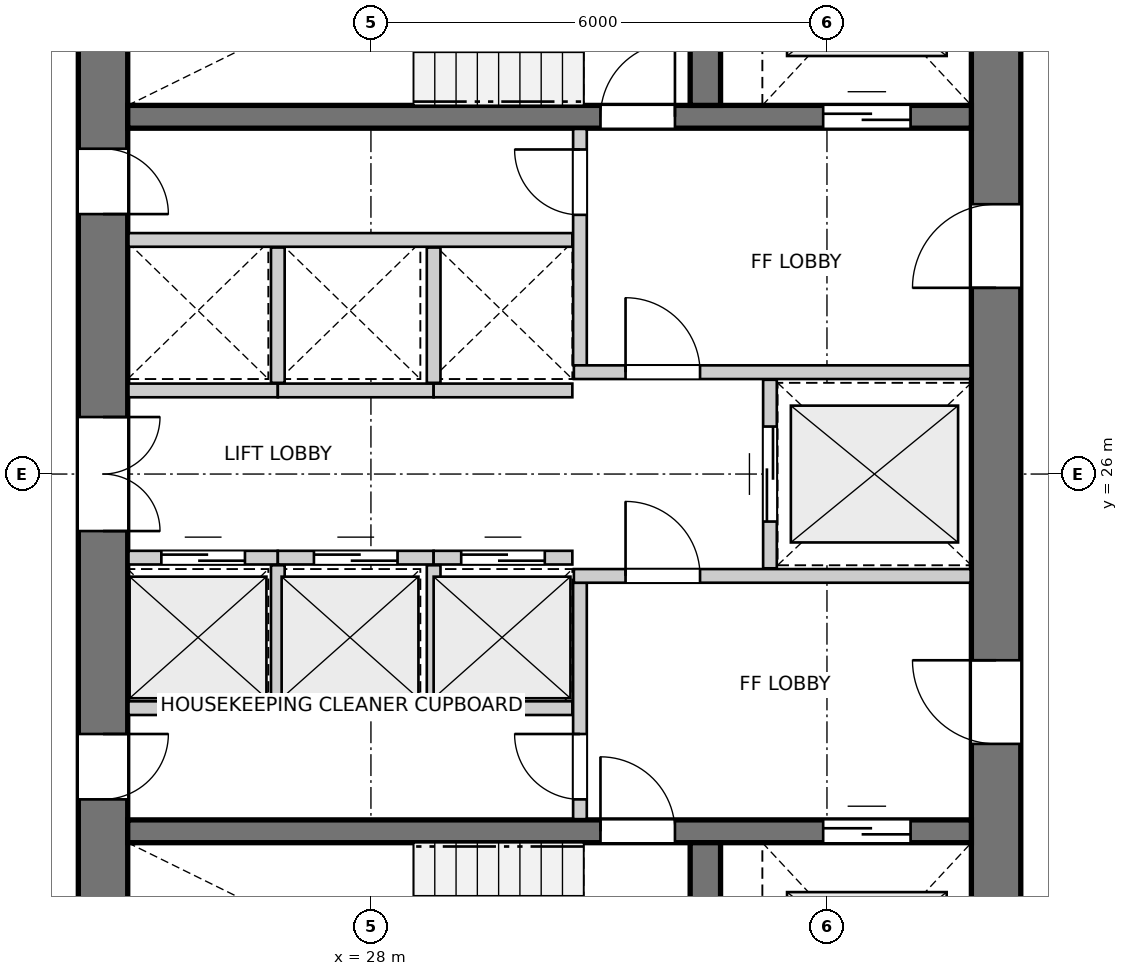
"""IFC4 building model, lengths in metres.
Left out: names, types, materials, properties, quantities, classifications, styles, units other than length and angle.
Written with IfcOpenShell. Run it as: python <this file> out.ifc"""

import sys

from ifc_helpers import new_model, si_unit, direction, frame, frame_2d, origin, place, context, subcontext, project, spatial, rectangle, extrude, source, transform, mapped, element, fill, save


model = new_model("IFC4")
c1 = context("Model", 3, precision=1e-05, world=origin(), true_north=direction((0.0, 1.0)))
c2 = subcontext(c1, "Body", "Model", "MODEL_VIEW")
j1 = project(units=[si_unit("LENGTHUNIT", "METRE"), si_unit("PLANEANGLEUNIT", "RADIAN")], contexts=[c1])
p1 = place(None, origin())
s1 = spatial("IfcSite", under=j1, at=p1, CompositionType="ELEMENT")
p2 = place(p1, origin())
s2 = spatial("IfcBuilding", under=s1, at=p2, CompositionType="ELEMENT")
p3 = place(p2, frame((0.0, 0.0, 99.2)))
s3 = spatial("IfcBuildingStorey", under=s2, at=p3, CompositionType="ELEMENT", Elevation=99.2)
p4 = place(p3, frame((24.475, 33.8, 0.0), z_axis=(0.0, 0.0, 1.0), x_axis=(0.0, -1.0, 0.0)))
e1 = element("IfcWall", 1, at=p4, inside=s3, PredefinedType="SHEAR", context=c2, shape_type="SweptSolid", body=[
    extrude(rectangle(XDim=15.6, YDim=0.65, at=frame_2d((7.8, 0.0))), origin(), (0.0, 0.0, 1.0), 2.95),
])
p5 = place(p4, frame((7.05, 0.0, 0.0)))
e2 = element("IfcOpeningElement", 2, at=p5, cuts=e1, PredefinedType="OPENING", context=c2, shape_type="SweptSolid", body=[
    extrude(rectangle(XDim=1.5, YDim=2.15, at=frame_2d((0.75, 1.075))), frame((0.0, 0.335, 0.0), z_axis=(0.0, -1.0, 0.0), x_axis=(1.0, 0.0, 0.0)), (0.0, 0.0, 1.0), 0.67),
])
p6 = place(p4, frame((3.52, 0.0, 0.0)))
e3 = element("IfcOpeningElement", 3, at=p6, cuts=e1, PredefinedType="OPENING", context=c2, shape_type="SweptSolid", body=[
    extrude(rectangle(XDim=0.86, YDim=2.05, at=frame_2d((0.43, 1.025))), frame((0.0, 0.335, 0.0), z_axis=(0.0, -1.0, 0.0), x_axis=(1.0, 0.0, 0.0)), (0.0, 0.0, 1.0), 0.67),
])
p7 = place(p4, frame((11.22, 0.0, 0.0)))
e4 = element("IfcOpeningElement", 4, at=p7, cuts=e1, PredefinedType="OPENING", context=c2, shape_type="SweptSolid", body=[
    extrude(rectangle(XDim=0.86, YDim=2.05, at=frame_2d((0.43, 1.025))), frame((0.0, 0.335, 0.0), z_axis=(0.0, -1.0, 0.0), x_axis=(1.0, 0.0, 0.0)), (0.0, 0.0, 1.0), 0.67),
])
p8 = place(p3, frame((36.225, 18.2, 0.0), z_axis=(0.0, 0.0, 1.0), x_axis=(0.0, 1.0, 0.0)))
e5 = element("IfcWall", 5, at=p8, inside=s3, PredefinedType="SHEAR", context=c2, shape_type="SweptSolid", body=[
    extrude(rectangle(XDim=15.6, YDim=0.65, at=frame_2d((7.8, 0.0))), origin(), (0.0, 0.0, 1.0), 2.95),
])
p9 = place(p8, frame((4.25, 0.0, 0.0)))
e6 = element("IfcOpeningElement", 6, at=p9, cuts=e5, PredefinedType="OPENING", context=c2, shape_type="SweptSolid", body=[
    extrude(rectangle(XDim=1.1, YDim=2.15, at=frame_2d((0.55, 1.075))), frame((0.0, 0.335, 0.0), z_axis=(0.0, -1.0, 0.0), x_axis=(1.0, 0.0, 0.0)), (0.0, 0.0, 1.0), 0.67),
])
p10 = place(p8, frame((10.25, 0.0, 0.0)))
e7 = element("IfcOpeningElement", 7, at=p10, cuts=e5, PredefinedType="OPENING", context=c2, shape_type="SweptSolid", body=[
    extrude(rectangle(XDim=1.1, YDim=2.15, at=frame_2d((0.55, 1.075))), frame((0.0, 0.335, 0.0), z_axis=(0.0, -1.0, 0.0), x_axis=(1.0, 0.0, 0.0)), (0.0, 0.0, 1.0), 0.67),
])
p11 = place(p3, frame((24.8, 21.3, 0.0), z_axis=(0.0, 0.0, 1.0), x_axis=(1.0, 0.0, 0.0)))
e8 = element("IfcWall", 8, at=p11, inside=s3, PredefinedType="SHEAR", context=c2, shape_type="SweptSolid", body=[
    extrude(rectangle(XDim=11.1, YDim=0.3, at=frame_2d((5.55, 0.0))), origin(), (0.0, 0.0, 1.0), 2.95),
])
p12 = place(p11, frame((6.22, 0.0, 0.0)))
e9 = element("IfcOpeningElement", 9, at=p12, cuts=e8, PredefinedType="OPENING", context=c2, shape_type="SweptSolid", body=[
    extrude(rectangle(XDim=0.98, YDim=2.15, at=frame_2d((0.49, 1.075))), frame((0.0, 0.16, 0.0), z_axis=(0.0, -1.0, 0.0), x_axis=(1.0, 0.0, 0.0)), (0.0, 0.0, 1.0), 0.32),
])
p13 = place(p11, frame((9.15, 0.0, 0.0)))
e10 = element("IfcOpeningElement", 10, at=p13, cuts=e8, PredefinedType="OPENING", context=c2, shape_type="SweptSolid", body=[
    extrude(rectangle(XDim=1.15, YDim=2.15, at=frame_2d((0.575, 1.075))), frame((0.0, 0.16, 0.0), z_axis=(0.0, -1.0, 0.0), x_axis=(1.0, 0.0, 0.0)), (0.0, 0.0, 1.0), 0.32),
])
p14 = place(p3, frame((32.4, 18.2, 0.0), z_axis=(0.0, 0.0, 1.0), x_axis=(0.0, 1.0, 0.0)))
e11 = element("IfcWall", 11, at=p14, inside=s3, PredefinedType="SHEAR", context=c2, shape_type="SweptSolid", body=[
    extrude(rectangle(XDim=2.95, YDim=0.4, at=frame_2d((1.475, 0.0))), origin(), (0.0, 0.0, 1.0), 2.95),
])
p15 = place(p3, frame((24.8, 30.7, 0.0), z_axis=(0.0, 0.0, 1.0), x_axis=(1.0, 0.0, 0.0)))
e12 = element("IfcWall", 12, at=p15, inside=s3, PredefinedType="SHEAR", context=c2, shape_type="SweptSolid", body=[
    extrude(rectangle(XDim=11.1, YDim=0.3, at=frame_2d((5.55, 0.0))), origin(), (0.0, 0.0, 1.0), 2.95),
])
p16 = place(p15, frame((6.22, 0.0, 0.0)))
e13 = element("IfcOpeningElement", 13, at=p16, cuts=e12, PredefinedType="OPENING", context=c2, shape_type="SweptSolid", body=[
    extrude(rectangle(XDim=0.98, YDim=2.15, at=frame_2d((0.49, 1.075))), frame((0.0, 0.16, 0.0), z_axis=(0.0, -1.0, 0.0), x_axis=(1.0, 0.0, 0.0)), (0.0, 0.0, 1.0), 0.32),
])
p17 = place(p15, frame((9.15, 0.0, 0.0)))
e14 = element("IfcOpeningElement", 14, at=p17, cuts=e12, PredefinedType="OPENING", context=c2, shape_type="SweptSolid", body=[
    extrude(rectangle(XDim=1.15, YDim=2.15, at=frame_2d((0.575, 1.075))), frame((0.0, 0.16, 0.0), z_axis=(0.0, -1.0, 0.0), x_axis=(1.0, 0.0, 0.0)), (0.0, 0.0, 1.0), 0.32),
])
p18 = place(p3, frame((32.4, 30.85, 0.0), z_axis=(0.0, 0.0, 1.0), x_axis=(0.0, 1.0, 0.0)))
e15 = element("IfcWall", 15, at=p18, inside=s3, PredefinedType="SHEAR", context=c2, shape_type="SweptSolid", body=[
    extrude(rectangle(XDim=2.95, YDim=0.4, at=frame_2d((1.475, 0.0))), origin(), (0.0, 0.0, 1.0), 2.95),
])
p19 = place(p3, frame((30.75, 21.46, 0.0), z_axis=(0.0, 0.0, 1.0), x_axis=(0.0, 1.0, 0.0)))
e16 = element("IfcWall", 16, at=p19, inside=s3, PredefinedType="PARTITIONING", context=c2, shape_type="SweptSolid", body=[
    extrude(rectangle(XDim=3.11, YDim=0.18, at=frame_2d((1.555, 0.0))), origin(), (0.0, 0.0, 1.0), 2.95),
])
p20 = place(p19, frame((0.26, 0.0, 0.0)))
e17 = element("IfcOpeningElement", 17, at=p20, cuts=e16, PredefinedType="OPENING", context=c2, shape_type="SweptSolid", body=[
    extrude(rectangle(XDim=0.86, YDim=2.05, at=frame_2d((0.43, 1.025))), frame((0.0, 0.1, 0.0), z_axis=(0.0, -1.0, 0.0), x_axis=(1.0, 0.0, 0.0)), (0.0, 0.0, 1.0), 0.2),
])
p21 = place(p3, frame((30.67, 24.66, 0.0), z_axis=(0.0, 0.0, 1.0), x_axis=(1.0, 0.0, 0.0)))
e18 = element("IfcWall", 18, at=p21, inside=s3, PredefinedType="PARTITIONING", context=c2, shape_type="SweptSolid", body=[
    extrude(rectangle(XDim=5.22, YDim=0.18, at=frame_2d((2.61, 0.0))), origin(), (0.0, 0.0, 1.0), 2.95),
])
p22 = place(p21, frame((0.68, 0.0, 0.0)))
e19 = element("IfcOpeningElement", 19, at=p22, cuts=e18, PredefinedType="OPENING", context=c2, shape_type="SweptSolid", body=[
    extrude(rectangle(XDim=0.98, YDim=2.15, at=frame_2d((0.49, 1.075))), frame((0.0, 0.1, 0.0), z_axis=(0.0, -1.0, 0.0), x_axis=(1.0, 0.0, 0.0)), (0.0, 0.0, 1.0), 0.2),
])
p23 = place(p3, frame((30.75, 27.43, 0.0), z_axis=(0.0, 0.0, 1.0), x_axis=(0.0, 1.0, 0.0)))
e20 = element("IfcWall", 20, at=p23, inside=s3, PredefinedType="PARTITIONING", context=c2, shape_type="SweptSolid", body=[
    extrude(rectangle(XDim=3.11, YDim=0.18, at=frame_2d((1.555, 0.0))), origin(), (0.0, 0.0, 1.0), 2.95),
])
p24 = place(p23, frame((1.98, 0.0, 0.0)))
e21 = element("IfcOpeningElement", 21, at=p24, cuts=e20, PredefinedType="OPENING", context=c2, shape_type="SweptSolid", body=[
    extrude(rectangle(XDim=0.86, YDim=2.05, at=frame_2d((0.43, 1.025))), frame((0.0, 0.1, 0.0), z_axis=(0.0, -1.0, 0.0), x_axis=(1.0, 0.0, 0.0)), (0.0, 0.0, 1.0), 0.2),
])
p25 = place(p3, frame((30.67, 27.34, 0.0), z_axis=(0.0, 0.0, 1.0), x_axis=(1.0, 0.0, 0.0)))
e22 = element("IfcWall", 22, at=p25, inside=s3, PredefinedType="PARTITIONING", context=c2, shape_type="SweptSolid", body=[
    extrude(rectangle(XDim=5.22, YDim=0.18, at=frame_2d((2.61, 0.0))), origin(), (0.0, 0.0, 1.0), 2.95),
])
p26 = place(p25, frame((0.68, 0.0, 0.0)))
e23 = element("IfcOpeningElement", 23, at=p26, cuts=e22, PredefinedType="OPENING", context=c2, shape_type="SweptSolid", body=[
    extrude(rectangle(XDim=0.98, YDim=2.15, at=frame_2d((0.49, 1.075))), frame((0.0, 0.1, 0.0), z_axis=(0.0, -1.0, 0.0), x_axis=(1.0, 0.0, 0.0)), (0.0, 0.0, 1.0), 0.2),
])
p27 = place(p3, frame((33.25, 24.76, 0.0), z_axis=(0.0, 0.0, 1.0), x_axis=(0.0, 1.0, 0.0)))
e24 = element("IfcWall", 24, at=p27, inside=s3, PredefinedType="PARTITIONING", context=c2, shape_type="SweptSolid", body=[
    extrude(rectangle(XDim=2.48, YDim=0.18, at=frame_2d((1.24, 0.0))), origin(), (0.0, 0.0, 1.0), 2.95),
])
p28 = place(p27, frame((0.615, 0.0, 0.0)))
e25 = element("IfcOpeningElement", 25, at=p28, cuts=e24, PredefinedType="OPENING", context=c2, shape_type="SweptSolid", body=[
    extrude(rectangle(XDim=1.25, YDim=2.15, at=frame_2d((0.625, 1.075))), frame((0.0, 0.1, 0.0), z_axis=(0.0, -1.0, 0.0), x_axis=(1.0, 0.0, 0.0)), (0.0, 0.0, 1.0), 0.2),
])
p29 = place(p3, frame((24.81, 22.92, 0.0), z_axis=(0.0, 0.0, 1.0), x_axis=(1.0, 0.0, 0.0)))
e26 = element("IfcWall", 26, at=p29, inside=s3, PredefinedType="PARTITIONING", context=c2, shape_type="SweptSolid", body=[
    extrude(rectangle(XDim=5.84, YDim=0.18, at=frame_2d((2.92, 0.0))), origin(), (0.0, 0.0, 1.0), 2.95),
])
p30 = place(p3, frame((24.81, 24.9, 0.0), z_axis=(0.0, 0.0, 1.0), x_axis=(1.0, 0.0, 0.0)))
e27 = element("IfcWall", 27, at=p30, inside=s3, PredefinedType="PARTITIONING", context=c2, shape_type="SweptSolid", body=[
    extrude(rectangle(XDim=1.965, YDim=0.18, at=frame_2d((0.982, 0.0))), origin(), (0.0, 0.0, 1.0), 2.95),
])
p31 = place(p30, frame((0.433, 0.0, 0.0)))
e28 = element("IfcOpeningElement", 28, at=p31, cuts=e27, PredefinedType="OPENING", context=c2, shape_type="SweptSolid", body=[
    extrude(rectangle(XDim=1.1, YDim=2.15, at=frame_2d((0.55, 1.075))), frame((0.0, 0.1, 0.0), z_axis=(0.0, -1.0, 0.0), x_axis=(1.0, 0.0, 0.0)), (0.0, 0.0, 1.0), 0.2),
])
p32 = place(p3, frame((26.775, 24.9, 0.0), z_axis=(0.0, 0.0, 1.0), x_axis=(1.0, 0.0, 0.0)))
e29 = element("IfcWall", 29, at=p32, inside=s3, PredefinedType="PARTITIONING", context=c2, shape_type="SweptSolid", body=[
    extrude(rectangle(XDim=2.05, YDim=0.18, at=frame_2d((1.025, 0.0))), origin(), (0.0, 0.0, 1.0), 2.95),
])
p33 = place(p32, frame((0.475, 0.0, 0.0)))
e30 = element("IfcOpeningElement", 30, at=p33, cuts=e29, PredefinedType="OPENING", context=c2, shape_type="SweptSolid", body=[
    extrude(rectangle(XDim=1.1, YDim=2.15, at=frame_2d((0.55, 1.075))), frame((0.0, 0.1, 0.0), z_axis=(0.0, -1.0, 0.0), x_axis=(1.0, 0.0, 0.0)), (0.0, 0.0, 1.0), 0.2),
])
p34 = place(p3, frame((26.775, 23.02, 0.0), z_axis=(0.0, 0.0, 1.0), x_axis=(0.0, 1.0, 0.0)))
e31 = element("IfcWall", 31, at=p34, inside=s3, PredefinedType="PARTITIONING", context=c2, shape_type="SweptSolid", body=[
    extrude(rectangle(XDim=1.78, YDim=0.18, at=frame_2d((0.89, 0.0))), origin(), (0.0, 0.0, 1.0), 2.95),
])
p35 = place(p3, frame((28.825, 24.9, 0.0), z_axis=(0.0, 0.0, 1.0), x_axis=(1.0, 0.0, 0.0)))
e32 = element("IfcWall", 32, at=p35, inside=s3, PredefinedType="PARTITIONING", context=c2, shape_type="SweptSolid", body=[
    extrude(rectangle(XDim=1.825, YDim=0.18, at=frame_2d((0.913, 0.0))), origin(), (0.0, 0.0, 1.0), 2.95),
])
p36 = place(p35, frame((0.363, 0.0, 0.0)))
e33 = element("IfcOpeningElement", 33, at=p36, cuts=e32, PredefinedType="OPENING", context=c2, shape_type="SweptSolid", body=[
    extrude(rectangle(XDim=1.1, YDim=2.15, at=frame_2d((0.55, 1.075))), frame((0.0, 0.1, 0.0), z_axis=(0.0, -1.0, 0.0), x_axis=(1.0, 0.0, 0.0)), (0.0, 0.0, 1.0), 0.2),
])
p37 = place(p3, frame((28.825, 23.02, 0.0), z_axis=(0.0, 0.0, 1.0), x_axis=(0.0, 1.0, 0.0)))
e34 = element("IfcWall", 34, at=p37, inside=s3, PredefinedType="PARTITIONING", context=c2, shape_type="SweptSolid", body=[
    extrude(rectangle(XDim=1.78, YDim=0.18, at=frame_2d((0.89, 0.0))), origin(), (0.0, 0.0, 1.0), 2.95),
])
p38 = place(p3, frame((24.81, 29.08, 0.0), z_axis=(0.0, 0.0, 1.0), x_axis=(1.0, 0.0, 0.0)))
e35 = element("IfcWall", 35, at=p38, inside=s3, PredefinedType="PARTITIONING", context=c2, shape_type="SweptSolid", body=[
    extrude(rectangle(XDim=5.84, YDim=0.18, at=frame_2d((2.92, 0.0))), origin(), (0.0, 0.0, 1.0), 2.95),
])
p39 = place(p3, frame((24.81, 27.1, 0.0), z_axis=(0.0, 0.0, 1.0), x_axis=(1.0, 0.0, 0.0)))
e36 = element("IfcWall", 36, at=p39, inside=s3, PredefinedType="PARTITIONING", context=c2, shape_type="SweptSolid", body=[
    extrude(rectangle(XDim=1.965, YDim=0.18, at=frame_2d((0.982, 0.0))), origin(), (0.0, 0.0, 1.0), 2.95),
])
p40 = place(p3, frame((26.775, 27.1, 0.0), z_axis=(0.0, 0.0, 1.0), x_axis=(1.0, 0.0, 0.0)))
e37 = element("IfcWall", 37, at=p40, inside=s3, PredefinedType="PARTITIONING", context=c2, shape_type="SweptSolid", body=[
    extrude(rectangle(XDim=2.05, YDim=0.18, at=frame_2d((1.025, 0.0))), origin(), (0.0, 0.0, 1.0), 2.95),
])
p41 = place(p3, frame((26.775, 27.2, 0.0), z_axis=(0.0, 0.0, 1.0), x_axis=(0.0, 1.0, 0.0)))
e38 = element("IfcWall", 38, at=p41, inside=s3, PredefinedType="PARTITIONING", context=c2, shape_type="SweptSolid", body=[
    extrude(rectangle(XDim=1.78, YDim=0.18, at=frame_2d((0.89, 0.0))), origin(), (0.0, 0.0, 1.0), 2.95),
])
p42 = place(p3, frame((28.825, 27.1, 0.0), z_axis=(0.0, 0.0, 1.0), x_axis=(1.0, 0.0, 0.0)))
e39 = element("IfcWall", 39, at=p42, inside=s3, PredefinedType="PARTITIONING", context=c2, shape_type="SweptSolid", body=[
    extrude(rectangle(XDim=1.825, YDim=0.18, at=frame_2d((0.913, 0.0))), origin(), (0.0, 0.0, 1.0), 2.95),
])
p43 = place(p3, frame((28.825, 27.2, 0.0), z_axis=(0.0, 0.0, 1.0), x_axis=(0.0, 1.0, 0.0)))
e40 = element("IfcWall", 40, at=p43, inside=s3, PredefinedType="PARTITIONING", context=c2, shape_type="SweptSolid", body=[
    extrude(rectangle(XDim=1.78, YDim=0.18, at=frame_2d((0.89, 0.0))), origin(), (0.0, 0.0, 1.0), 2.95),
])
m1 = source(origin(), c2, "Body", "SweptSolid", [
    extrude(rectangle(XDim=0.98, YDim=2.15, at=frame_2d((0.49, 1.075))), frame((0.0, 0.025, 0.0), z_axis=(0.0, -1.0, 0.0), x_axis=(1.0, 0.0, 0.0)), (0.0, 0.0, 1.0), 0.05),
])
p44 = place(p12, origin())
e41 = element("IfcDoor", 41, at=p44, inside=s3, OperationType="SINGLE_SWING_LEFT", PredefinedType="DOOR", context=c2, shape_type="MappedRepresentation", body=[
    mapped(m1, transform((0.0, 0.0, 0.0), x_axis=(1.0, 0.0, 0.0), y_axis=(0.0, 1.0, 0.0), z_axis=(0.0, 0.0, 1.0), scale=1.0)),
])
fill(e9, e41)
m2 = source(origin(), c2, "Body", "SweptSolid", [
    extrude(rectangle(XDim=1.15, YDim=2.15, at=frame_2d((0.575, 1.075))), frame((0.0, 0.025, 0.0), z_axis=(0.0, -1.0, 0.0), x_axis=(1.0, 0.0, 0.0)), (0.0, 0.0, 1.0), 0.05),
])
p45 = place(p13, origin())
e42 = element("IfcDoor", 42, at=p45, inside=s3, OperationType="DOUBLE_DOOR_SLIDING", PredefinedType="DOOR", context=c2, shape_type="MappedRepresentation", body=[
    mapped(m2, transform((0.0, 0.0, 0.0), x_axis=(1.0, 0.0, 0.0), y_axis=(0.0, 1.0, 0.0), z_axis=(0.0, 0.0, 1.0), scale=1.0)),
])
fill(e10, e42)
p46 = place(p16, origin())
e43 = element("IfcDoor", 43, at=p46, inside=s3, OperationType="SINGLE_SWING_RIGHT", PredefinedType="DOOR", context=c2, shape_type="MappedRepresentation", body=[
    mapped(m1, transform((0.0, 0.0, 0.0), x_axis=(1.0, 0.0, 0.0), y_axis=(0.0, 1.0, 0.0), z_axis=(0.0, 0.0, 1.0), scale=1.0)),
])
fill(e13, e43)
p47 = place(p17, origin())
e44 = element("IfcDoor", 44, at=p47, inside=s3, OperationType="DOUBLE_DOOR_SLIDING", PredefinedType="DOOR", context=c2, shape_type="MappedRepresentation", body=[
    mapped(m2, transform((0.0, 0.0, 0.0), x_axis=(1.0, 0.0, 0.0), y_axis=(0.0, 1.0, 0.0), z_axis=(0.0, 0.0, 1.0), scale=1.0)),
])
fill(e14, e44)
m3 = source(origin(), c2, "Body", "SweptSolid", [
    extrude(rectangle(XDim=1.1, YDim=2.15, at=frame_2d((0.55, 1.075))), frame((0.0, 0.025, 0.0), z_axis=(0.0, -1.0, 0.0), x_axis=(1.0, 0.0, 0.0)), (0.0, 0.0, 1.0), 0.05),
])
p48 = place(p9, origin())
e45 = element("IfcDoor", 45, at=p48, inside=s3, OperationType="SINGLE_SWING_RIGHT", PredefinedType="DOOR", context=c2, shape_type="MappedRepresentation", body=[
    mapped(m3, transform((0.0, 0.0, 0.0), x_axis=(1.0, 0.0, 0.0), y_axis=(0.0, 1.0, 0.0), z_axis=(0.0, 0.0, 1.0), scale=1.0)),
])
fill(e6, e45)
p49 = place(p10, origin())
e46 = element("IfcDoor", 46, at=p49, inside=s3, OperationType="SINGLE_SWING_LEFT", PredefinedType="DOOR", context=c2, shape_type="MappedRepresentation", body=[
    mapped(m3, transform((0.0, 0.0, 0.0), x_axis=(1.0, 0.0, 0.0), y_axis=(0.0, 1.0, 0.0), z_axis=(0.0, 0.0, 1.0), scale=1.0)),
])
fill(e7, e46)
m4 = source(origin(), c2, "Body", "SweptSolid", [
    extrude(rectangle(XDim=1.5, YDim=2.15, at=frame_2d((0.75, 1.075))), frame((0.0, 0.025, 0.0), z_axis=(0.0, -1.0, 0.0), x_axis=(1.0, 0.0, 0.0)), (0.0, 0.0, 1.0), 0.05),
])
p50 = place(p5, origin())
e47 = element("IfcDoor", 47, at=p50, inside=s3, OperationType="DOUBLE_DOOR_SINGLE_SWING", PredefinedType="DOOR", context=c2, shape_type="MappedRepresentation", body=[
    mapped(m4, transform((0.0, 0.0, 0.0), x_axis=(1.0, 0.0, 0.0), y_axis=(0.0, 1.0, 0.0), z_axis=(0.0, 0.0, 1.0), scale=1.0)),
])
fill(e2, e47)
m5 = source(origin(), c2, "Body", "SweptSolid", [
    extrude(rectangle(XDim=0.86, YDim=2.05, at=frame_2d((0.43, 1.025))), frame((0.0, 0.025, 0.0), z_axis=(0.0, -1.0, 0.0), x_axis=(1.0, 0.0, 0.0)), (0.0, 0.0, 1.0), 0.05),
])
p51 = place(p6, origin())
e48 = element("IfcDoor", 48, at=p51, inside=s3, OperationType="SINGLE_SWING_RIGHT", PredefinedType="DOOR", context=c2, shape_type="MappedRepresentation", body=[
    mapped(m5, transform((0.0, 0.0, 0.0), x_axis=(1.0, 0.0, 0.0), y_axis=(0.0, 1.0, 0.0), z_axis=(0.0, 0.0, 1.0), scale=1.0)),
])
fill(e3, e48)
p52 = place(p7, origin())
e49 = element("IfcDoor", 49, at=p52, inside=s3, OperationType="SINGLE_SWING_LEFT", PredefinedType="DOOR", context=c2, shape_type="MappedRepresentation", body=[
    mapped(m5, transform((0.0, 0.0, 0.0), x_axis=(1.0, 0.0, 0.0), y_axis=(0.0, 1.0, 0.0), z_axis=(0.0, 0.0, 1.0), scale=1.0)),
])
fill(e4, e49)
p53 = place(p20, origin())
e50 = element("IfcDoor", 50, at=p53, inside=s3, OperationType="SINGLE_SWING_RIGHT", PredefinedType="DOOR", context=c2, shape_type="MappedRepresentation", body=[
    mapped(m5, transform((0.0, 0.0, 0.0), x_axis=(1.0, 0.0, 0.0), y_axis=(0.0, 1.0, 0.0), z_axis=(0.0, 0.0, 1.0), scale=1.0)),
])
fill(e17, e50)
p54 = place(p22, origin())
e51 = element("IfcDoor", 51, at=p54, inside=s3, OperationType="SINGLE_SWING_LEFT", PredefinedType="DOOR", context=c2, shape_type="MappedRepresentation", body=[
    mapped(m1, transform((0.0, 0.0, 0.0), x_axis=(1.0, 0.0, 0.0), y_axis=(0.0, 1.0, 0.0), z_axis=(0.0, 0.0, 1.0), scale=1.0)),
])
fill(e19, e51)
p55 = place(p24, origin())
e52 = element("IfcDoor", 52, at=p55, inside=s3, OperationType="SINGLE_SWING_RIGHT", PredefinedType="DOOR", context=c2, shape_type="MappedRepresentation", body=[
    mapped(m5, transform((0.0, 0.0, 0.0), x_axis=(1.0, 0.0, 0.0), y_axis=(0.0, 1.0, 0.0), z_axis=(0.0, 0.0, 1.0), scale=1.0)),
])
fill(e21, e52)
p56 = place(p26, origin())
e53 = element("IfcDoor", 53, at=p56, inside=s3, OperationType="SINGLE_SWING_LEFT", PredefinedType="DOOR", context=c2, shape_type="MappedRepresentation", body=[
    mapped(m1, transform((0.0, 0.0, 0.0), x_axis=(1.0, 0.0, 0.0), y_axis=(0.0, 1.0, 0.0), z_axis=(0.0, 0.0, 1.0), scale=1.0)),
])
fill(e23, e53)
m6 = source(origin(), c2, "Body", "SweptSolid", [
    extrude(rectangle(XDim=1.25, YDim=2.15, at=frame_2d((0.625, 1.075))), frame((0.0, 0.025, 0.0), z_axis=(0.0, -1.0, 0.0), x_axis=(1.0, 0.0, 0.0)), (0.0, 0.0, 1.0), 0.05),
])
p57 = place(p28, origin())
e54 = element("IfcDoor", 54, at=p57, inside=s3, OperationType="DOUBLE_DOOR_SLIDING", PredefinedType="DOOR", context=c2, shape_type="MappedRepresentation", body=[
    mapped(m6, transform((0.0, 0.0, 0.0), x_axis=(1.0, 0.0, 0.0), y_axis=(0.0, 1.0, 0.0), z_axis=(0.0, 0.0, 1.0), scale=1.0)),
])
fill(e25, e54)
p58 = place(p31, origin())
e55 = element("IfcDoor", 55, at=p58, inside=s3, OperationType="DOUBLE_DOOR_SLIDING", PredefinedType="DOOR", context=c2, shape_type="MappedRepresentation", body=[
    mapped(m3, transform((0.0, 0.0, 0.0), x_axis=(1.0, 0.0, 0.0), y_axis=(0.0, 1.0, 0.0), z_axis=(0.0, 0.0, 1.0), scale=1.0)),
])
fill(e28, e55)
p59 = place(p33, origin())
e56 = element("IfcDoor", 56, at=p59, inside=s3, OperationType="DOUBLE_DOOR_SLIDING", PredefinedType="DOOR", context=c2, shape_type="MappedRepresentation", body=[
    mapped(m3, transform((0.0, 0.0, 0.0), x_axis=(1.0, 0.0, 0.0), y_axis=(0.0, 1.0, 0.0), z_axis=(0.0, 0.0, 1.0), scale=1.0)),
])
fill(e30, e56)
p60 = place(p36, origin())
e57 = element("IfcDoor", 57, at=p60, inside=s3, OperationType="DOUBLE_DOOR_SLIDING", PredefinedType="DOOR", context=c2, shape_type="MappedRepresentation", body=[
    mapped(m3, transform((0.0, 0.0, 0.0), x_axis=(1.0, 0.0, 0.0), y_axis=(0.0, 1.0, 0.0), z_axis=(0.0, 0.0, 1.0), scale=1.0)),
])
fill(e33, e57)
save(model, sys.argv[1])
